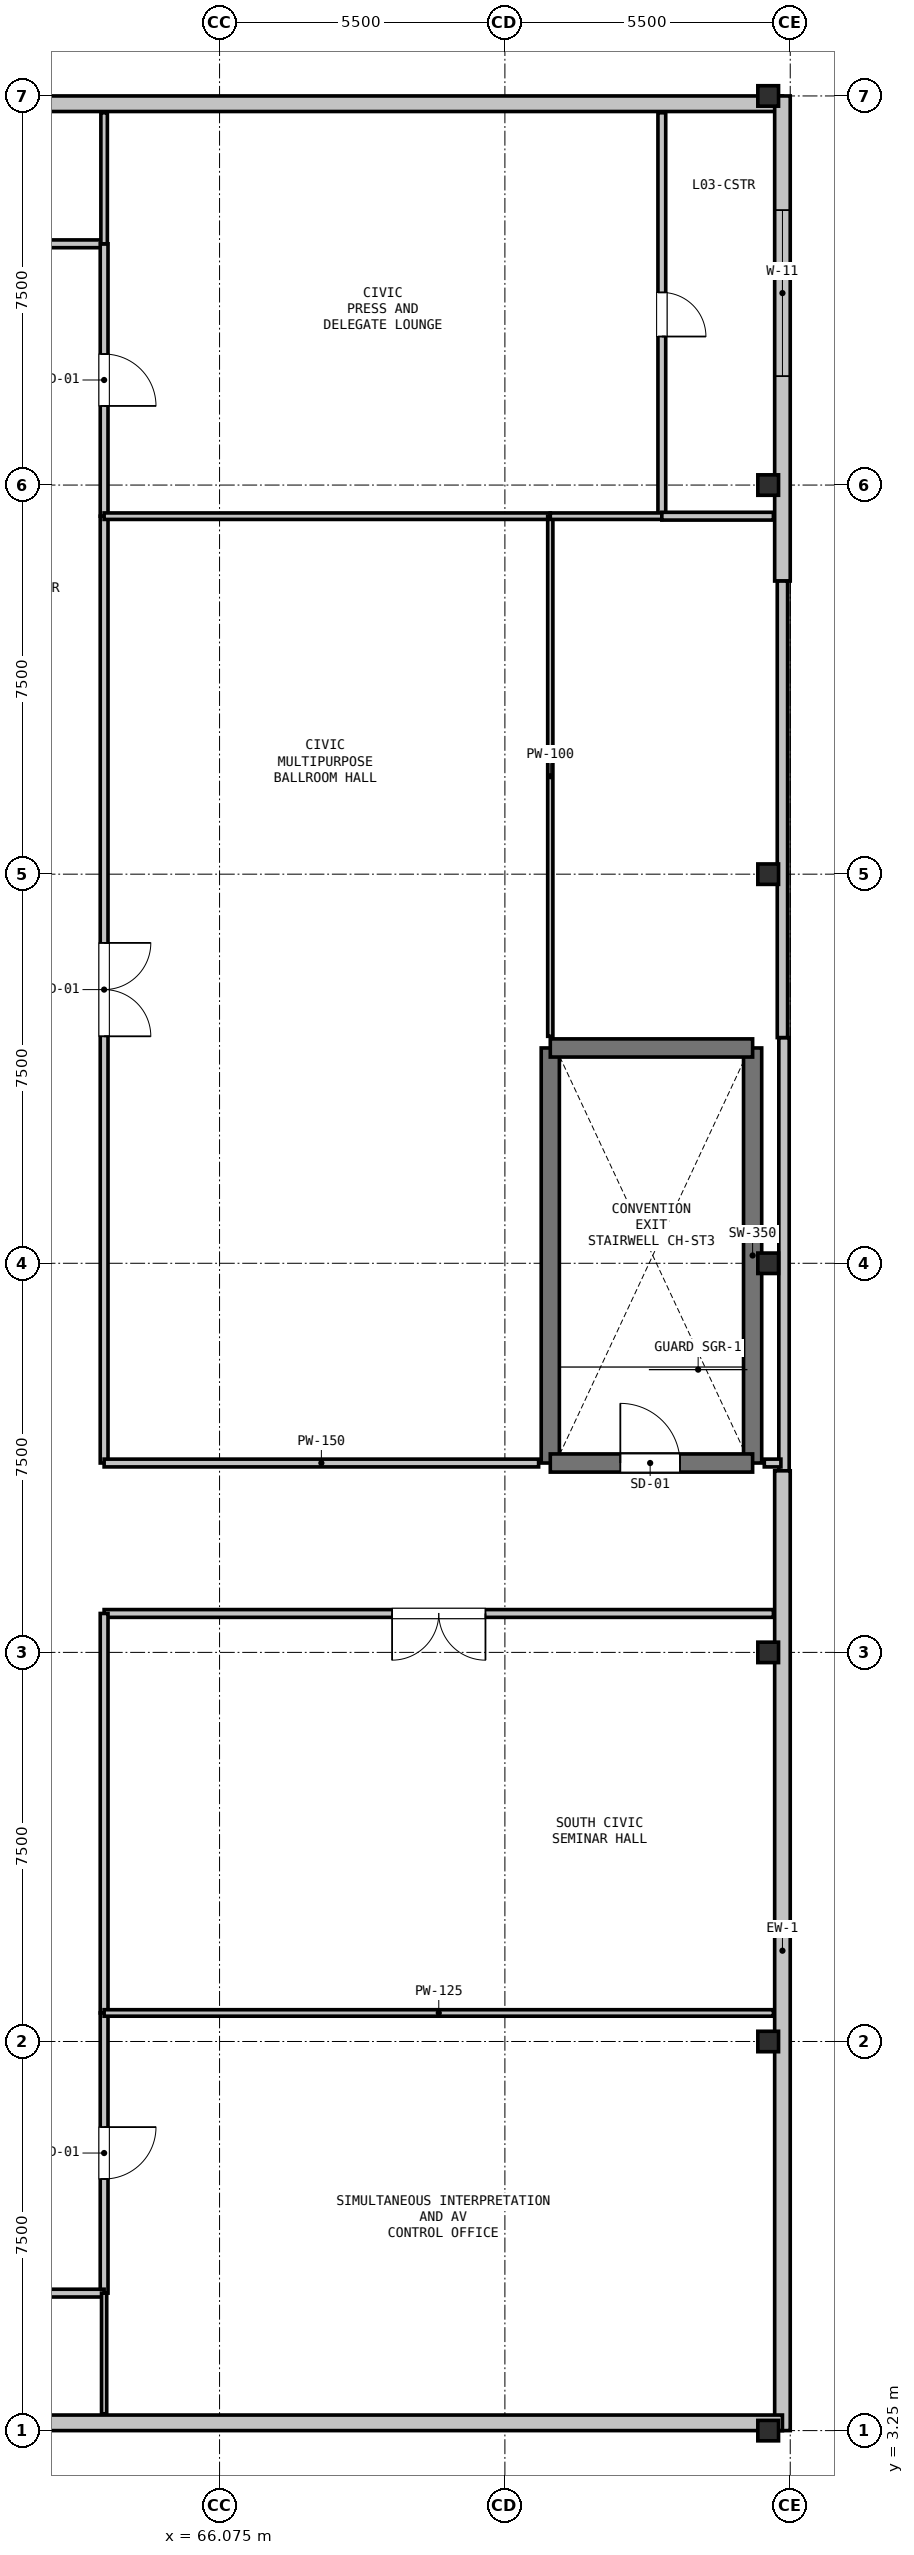
"""IFC4 building model, lengths in metres.
Left out: names, types, materials, properties, quantities, classifications, styles, units other than length and angle.
Written with IfcOpenShell. Run it as: python <this file> out.ifc"""

import sys

from ifc_helpers import new_model, si_unit, direction, frame, frame_2d, origin, origin_2d, place, context, subcontext, project, spatial, rectangle, i_section, extrude, element, fill, save


model = new_model("IFC4")
c1 = context("Model", 3, precision=1e-05, world=origin(), true_north=direction((0.0, 1.0)))
c2 = subcontext(c1, "Body", "Model", "MODEL_VIEW")
j1 = project(units=[si_unit("LENGTHUNIT", "METRE"), si_unit("PLANEANGLEUNIT", "RADIAN")], contexts=[c1])
p1 = place(None, origin())
s1 = spatial("IfcSite", under=j1, at=p1, CompositionType="ELEMENT")
p2 = place(p1, origin())
s2 = spatial("IfcBuilding", under=s1, at=p2, CompositionType="ELEMENT")
p3 = place(p2, frame((0.0, 0.0, 14.4)))
s3 = spatial("IfcBuildingStorey", under=s2, at=p3, CompositionType="ELEMENT", Elevation=14.4)
for number, where, z_axis, x_axis in (
    (1, (76.65, 3.25, 0.0), (0.0, 0.0, 1.0), (1.0, 0.0, 0.0)),
    (2, (76.65, 10.75, 0.0), (0.0, 0.0, 1.0), (1.0, 0.0, 0.0)),
    (3, (76.65, 18.25, 0.0), (0.0, 0.0, 1.0), (1.0, 0.0, 0.0)),
    (4, (76.65, 25.75, 0.0), (0.0, 0.0, 1.0), (1.0, 0.0, 0.0)),
    (5, (76.65, 33.25, 0.0), (0.0, 0.0, 1.0), (1.0, 0.0, 0.0)),
    (6, (76.65, 40.75, 0.0), (0.0, 0.0, 1.0), (1.0, 0.0, 0.0)),
    (7, (76.65, 48.25, 0.0), (0.0, 0.0, 1.0), (1.0, 0.0, 0.0)),
):
    element("IfcColumn", number, at=place(p3, frame(where, z_axis=z_axis, x_axis=x_axis)), inside=s3, PredefinedType="COLUMN", context=c2, shape_type="SweptSolid", body=[
        extrude(i_section(OverallWidth=0.399, OverallDepth=0.394, WebThickness=0.023, FlangeThickness=0.037, at=origin_2d()), origin(), (0.0, 0.0, 1.0), 4.8),
    ])
p4 = place(p3, frame((76.955, 30.1, 0.0), z_axis=(0.0, 0.0, 1.0), x_axis=(0.0, -1.0, 0.0)))
e8 = element("IfcWall", 8, at=p4, inside=s3, PredefinedType="PARAPET", context=c2, shape_type="SweptSolid", body=[
    extrude(rectangle(XDim=8.35, YDim=0.2, at=frame_2d((4.175, 0.0))), origin(), (0.0, 0.0, 1.0), 4.41),
])
p5 = place(p3, frame((59.8, 48.1, 0.0), z_axis=(0.0, 0.0, 1.0), x_axis=(1.0, 0.0, 0.0)))
e9 = element("IfcWall", 9, at=p5, inside=s3, PredefinedType="SOLIDWALL", context=c2, shape_type="SweptSolid", body=[
    extrude(rectangle(XDim=17.125, YDim=0.3, at=frame_2d((8.562, 0.0))), origin(), (0.0, 0.0, 1.0), 3.858),
])
p6 = place(p3, frame((76.925, 48.25, 0.0), z_axis=(0.0, 0.0, 1.0), x_axis=(0.0, -1.0, 0.0)))
e10 = element("IfcWall", 10, at=p6, inside=s3, PredefinedType="SOLIDWALL", context=c2, shape_type="SweptSolid", body=[
    extrude(rectangle(XDim=9.35, YDim=0.3, at=frame_2d((4.675, 0.0))), origin(), (0.0, 0.0, 1.0), 4.41),
])
p7 = place(p6, frame((2.2, 0.0, 0.9)))
e11 = element("IfcOpeningElement", 11, at=p7, cuts=e10, PredefinedType="OPENING", context=c2, shape_type="SweptSolid", body=[
    extrude(rectangle(XDim=3.2, YDim=2.4, at=frame_2d((1.6, 1.2))), frame((0.0, 0.16, 0.0), z_axis=(0.0, -1.0, 0.0), x_axis=(1.0, 0.0, 0.0)), (0.0, 0.0, 1.0), 0.32),
])
p8 = place(p3, frame((76.925, 21.75, 0.0), z_axis=(0.0, 0.0, 1.0), x_axis=(0.0, -1.0, 0.0)))
e12 = element("IfcWall", 12, at=p8, inside=s3, PredefinedType="SOLIDWALL", context=c2, shape_type="SweptSolid", body=[
    extrude(rectangle(XDim=18.5, YDim=0.3, at=frame_2d((9.25, 0.0))), origin(), (0.0, 0.0, 1.0), 4.41),
])
p9 = place(p3, frame((76.925, 3.4, 0.0), z_axis=(0.0, 0.0, 1.0), x_axis=(-1.0, 0.0, 0.0)))
e13 = element("IfcWall", 13, at=p9, inside=s3, PredefinedType="SOLIDWALL", context=c2, shape_type="SweptSolid", body=[
    extrude(rectangle(XDim=17.125, YDim=0.3, at=frame_2d((8.562, 0.0))), origin(), (0.0, 0.0, 1.0), 3.858),
])
p10 = place(p3, frame((76.925, 38.9, 0.0), z_axis=(0.0, 0.0, 1.0), x_axis=(0.0, -1.0, 0.0)))
e14 = element("IfcWall", 14, at=p10, inside=s3, PredefinedType="PARAPET", context=c2, shape_type="SweptSolid", body=[
    extrude(rectangle(XDim=8.8, YDim=0.2, at=frame_2d((4.4, 0.0))), origin(), (0.0, 0.0, 1.0), 0.2),
])
for number, where, z_axis, x_axis in (
    (15, (76.35, 29.9, 0.0), (0.0, 0.0, 1.0), (0.0, -1.0, 0.0)),
    (16, (72.45, 21.9, 0.0), (0.0, 0.0, 1.0), (0.0, 1.0, 0.0)),
):
    element("IfcWall", number, at=place(p3, frame(where, z_axis=z_axis, x_axis=x_axis)), inside=s3, PredefinedType="SHEAR", context=c2, shape_type="SweptSolid", body=[
        extrude(rectangle(XDim=8.0, YDim=0.35, at=frame_2d((4.0, 0.0))), origin(), (0.0, 0.0, 1.0), 4.8),
    ])
p11 = place(p3, frame((72.45, 29.9, 0.0), z_axis=(0.0, 0.0, 1.0), x_axis=(1.0, 0.0, 0.0)))
e17 = element("IfcWall", 17, at=p11, inside=s3, PredefinedType="SHEAR", context=c2, shape_type="SweptSolid", body=[
    extrude(rectangle(XDim=3.9, YDim=0.35, at=frame_2d((1.95, 0.0))), origin(), (0.0, 0.0, 1.0), 4.8),
])
p12 = place(p3, frame((72.45, 21.9, 0.0), z_axis=(0.0, 0.0, 1.0), x_axis=(1.0, 0.0, 0.0)))
e18 = element("IfcWall", 18, at=p12, inside=s3, PredefinedType="SHEAR", context=c2, shape_type="SweptSolid", body=[
    extrude(rectangle(XDim=3.9, YDim=0.35, at=frame_2d((1.95, 0.0))), origin(), (0.0, 0.0, 1.0), 4.8),
])
p13 = place(p12, frame((1.35, 0.0, 0.0)))
e19 = element("IfcOpeningElement", 19, at=p13, cuts=e18, PredefinedType="OPENING", context=c2, shape_type="SweptSolid", body=[
    extrude(rectangle(XDim=1.15, YDim=2.15, at=frame_2d((0.575, 1.075))), frame((0.0, 0.185, 0.0), z_axis=(0.0, -1.0, 0.0), x_axis=(1.0, 0.0, 0.0)), (0.0, 0.0, 1.0), 0.37),
])
p14 = place(p3, frame((61.875, 45.4, 0.0), z_axis=(0.0, 0.0, 1.0), x_axis=(1.0, 0.0, 0.0)))
e20 = element("IfcWall", 20, at=p14, inside=s3, PredefinedType="PARTITIONING", context=c2, shape_type="SweptSolid", body=[
    extrude(rectangle(XDim=1.975, YDim=0.15, at=frame_2d((0.988, 0.0))), origin(), (0.0, 0.0, 1.0), 4.479),
])
p15 = place(p3, frame((63.85, 45.4, 0.0), z_axis=(0.0, 0.0, 1.0), x_axis=(0.0, -1.0, 0.0)))
e21 = element("IfcWall", 21, at=p15, inside=s3, PredefinedType="PARTITIONING", context=c2, shape_type="SweptSolid", body=[
    extrude(rectangle(XDim=5.25, YDim=0.15, at=frame_2d((2.625, 0.0))), origin(), (0.0, 0.0, 1.0), 3.858),
])
p16 = place(p15, frame((2.125, 0.0, 0.0)))
e22 = element("IfcOpeningElement", 22, at=p16, cuts=e21, PredefinedType="OPENING", context=c2, shape_type="SweptSolid", body=[
    extrude(rectangle(XDim=1.0, YDim=2.15, at=frame_2d((0.5, 1.075))), frame((0.0, 0.085, 0.0), z_axis=(0.0, -1.0, 0.0), x_axis=(1.0, 0.0, 0.0)), (0.0, 0.0, 1.0), 0.17),
])
p17 = place(p3, frame((63.85, 40.15, 0.0), z_axis=(0.0, 0.0, 1.0), x_axis=(0.0, -1.0, 0.0)))
e23 = element("IfcWall", 23, at=p17, inside=s3, PredefinedType="PARTITIONING", context=c2, shape_type="SweptSolid", body=[
    extrude(rectangle(XDim=18.25, YDim=0.15, at=frame_2d((9.125, 0.0))), origin(), (0.0, 0.0, 1.0), 3.858),
])
p18 = place(p17, frame((8.225, 0.0, 0.0)))
e24 = element("IfcOpeningElement", 24, at=p18, cuts=e23, PredefinedType="OPENING", context=c2, shape_type="SweptSolid", body=[
    extrude(rectangle(XDim=1.8, YDim=2.2, at=frame_2d((0.9, 1.1))), frame((0.0, 0.085, 0.0), z_axis=(0.0, -1.0, 0.0), x_axis=(1.0, 0.0, 0.0)), (0.0, 0.0, 1.0), 0.17),
])
p19 = place(p3, frame((63.85, 21.9, 0.0), z_axis=(0.0, 0.0, 1.0), x_axis=(1.0, 0.0, 0.0)))
e25 = element("IfcWall", 25, at=p19, inside=s3, PredefinedType="PARTITIONING", context=c2, shape_type="SweptSolid", body=[
    extrude(rectangle(XDim=8.375, YDim=0.15, at=frame_2d((4.188, 0.0))), origin(), (0.0, 0.0, 1.0), 4.479),
])
p20 = place(p3, frame((76.575, 21.9, 0.0), z_axis=(0.0, 0.0, 1.0), x_axis=(1.0, 0.0, 0.0)))
e26 = element("IfcWall", 26, at=p20, inside=s3, PredefinedType="PARTITIONING", context=c2, shape_type="SweptSolid", body=[
    extrude(rectangle(XDim=0.32, YDim=0.15, at=frame_2d((0.16, 0.0))), origin(), (0.0, 0.0, 1.0), 4.41),
])
p21 = place(p3, frame((76.751, 19.0, 0.0), z_axis=(0.0, 0.0, 1.0), x_axis=(-1.0, 0.0, 0.0)))
e27 = element("IfcWall", 27, at=p21, inside=s3, PredefinedType="PARTITIONING", context=c2, shape_type="SweptSolid", body=[
    extrude(rectangle(XDim=12.901, YDim=0.15, at=frame_2d((6.45, 0.0))), origin(), (0.0, 0.0, 1.0), 4.41),
])
p22 = place(p21, frame((5.551, 0.0, 0.0)))
e28 = element("IfcOpeningElement", 28, at=p22, cuts=e27, PredefinedType="OPENING", context=c2, shape_type="SweptSolid", body=[
    extrude(rectangle(XDim=1.8, YDim=2.2, at=frame_2d((0.9, 1.1))), frame((0.0, 0.085, 0.0), z_axis=(0.0, -1.0, 0.0), x_axis=(1.0, 0.0, 0.0)), (0.0, 0.0, 1.0), 0.17),
])
p23 = place(p3, frame((63.85, 19.0, 0.0), z_axis=(0.0, 0.0, 1.0), x_axis=(0.0, -1.0, 0.0)))
e29 = element("IfcWall", 29, at=p23, inside=s3, PredefinedType="PARTITIONING", context=c2, shape_type="SweptSolid", body=[
    extrude(rectangle(XDim=7.7, YDim=0.15, at=frame_2d((3.85, 0.0))), origin(), (0.0, 0.0, 1.0), 3.858),
])
p24 = place(p3, frame((63.85, 11.3, 0.0), z_axis=(0.0, 0.0, 1.0), x_axis=(0.0, -1.0, 0.0)))
e30 = element("IfcWall", 30, at=p24, inside=s3, PredefinedType="PARTITIONING", context=c2, shape_type="SweptSolid", body=[
    extrude(rectangle(XDim=5.4, YDim=0.15, at=frame_2d((2.7, 0.0))), origin(), (0.0, 0.0, 1.0), 3.858),
])
p25 = place(p24, frame((2.2, 0.0, 0.0)))
e31 = element("IfcOpeningElement", 31, at=p25, cuts=e30, PredefinedType="OPENING", context=c2, shape_type="SweptSolid", body=[
    extrude(rectangle(XDim=1.0, YDim=2.15, at=frame_2d((0.5, 1.075))), frame((0.0, 0.085, 0.0), z_axis=(0.0, -1.0, 0.0), x_axis=(1.0, 0.0, 0.0)), (0.0, 0.0, 1.0), 0.17),
])
p26 = place(p3, frame((63.85, 5.9, 0.0), z_axis=(0.0, 0.0, 1.0), x_axis=(-1.0, 0.0, 0.0)))
e32 = element("IfcWall", 32, at=p26, inside=s3, PredefinedType="PARTITIONING", context=c2, shape_type="SweptSolid", body=[
    extrude(rectangle(XDim=1.975, YDim=0.15, at=frame_2d((0.988, 0.0))), origin(), (0.0, 0.0, 1.0), 4.479),
])
p27 = place(p3, frame((63.85, 40.15, 0.0), z_axis=(0.0, 0.0, 1.0), x_axis=(1.0, 0.0, 0.0)))
e33 = element("IfcWall", 33, at=p27, inside=s3, PredefinedType="PARTITIONING", context=c2, shape_type="SweptSolid", body=[
    extrude(rectangle(XDim=8.6, YDim=0.125, at=frame_2d((4.3, 0.0))), origin(), (0.0, 0.0, 1.0), 4.479),
])
p28 = place(p3, frame((72.45, 40.15, 0.0), z_axis=(0.0, 0.0, 1.0), x_axis=(0.0, -1.0, 0.0)))
e34 = element("IfcWall", 34, at=p28, inside=s3, PredefinedType="PARTITIONING", context=c2, shape_type="SweptSolid", body=[
    extrude(rectangle(XDim=10.025, YDim=0.1, at=frame_2d((5.012, 0.0))), origin(), (0.0, 0.0, 1.0), 3.858),
])
p29 = place(p3, frame((76.751, 11.3, 0.0), z_axis=(0.0, 0.0, 1.0), x_axis=(-1.0, 0.0, 0.0)))
e35 = element("IfcWall", 35, at=p29, inside=s3, PredefinedType="PARTITIONING", context=c2, shape_type="SweptSolid", body=[
    extrude(rectangle(XDim=12.901, YDim=0.125, at=frame_2d((6.45, 0.0))), origin(), (0.0, 0.0, 1.0), 4.41),
])
p30 = place(p3, frame((63.85, 3.574, 0.0), z_axis=(0.0, 0.0, 1.0), x_axis=(0.0, 1.0, 0.0)))
e36 = element("IfcWall", 36, at=p30, inside=s3, PredefinedType="PARTITIONING", context=c2, shape_type="SweptSolid", body=[
    extrude(rectangle(XDim=2.326, YDim=0.1, at=frame_2d((1.163, 0.0))), origin(), (0.0, 0.0, 1.0), 4.8),
])
p31 = place(p3, frame((63.85, 45.4, 0.0), z_axis=(0.0, 0.0, 1.0), x_axis=(0.0, 1.0, 0.0)))
e37 = element("IfcWall", 37, at=p31, inside=s3, PredefinedType="PARTITIONING", context=c2, shape_type="SweptSolid", body=[
    extrude(rectangle(XDim=2.526, YDim=0.125, at=frame_2d((1.263, 0.0))), origin(), (0.0, 0.0, 1.0), 4.8),
])
p32 = place(p3, frame((74.6, 47.926, 0.0), z_axis=(0.0, 0.0, 1.0), x_axis=(0.0, -1.0, 0.0)))
e38 = element("IfcWall", 38, at=p32, inside=s3, PredefinedType="PARTITIONING", context=c2, shape_type="SweptSolid", body=[
    extrude(rectangle(XDim=7.776, YDim=0.15, at=frame_2d((3.888, 0.0))), origin(), (0.0, 0.0, 1.0), 3.858),
])
p33 = place(p32, frame((3.463, 0.0, 0.0)))
e39 = element("IfcOpeningElement", 39, at=p33, cuts=e38, PredefinedType="OPENING", context=c2, shape_type="SweptSolid", body=[
    extrude(rectangle(XDim=0.85, YDim=2.1, at=frame_2d((0.425, 1.05))), frame((0.0, 0.085, 0.0), z_axis=(0.0, -1.0, 0.0), x_axis=(1.0, 0.0, 0.0)), (0.0, 0.0, 1.0), 0.17),
])
p34 = place(p3, frame((74.6, 40.15, 0.0), z_axis=(0.0, 0.0, 1.0), x_axis=(-1.0, 0.0, 0.0)))
e40 = element("IfcWall", 40, at=p34, inside=s3, PredefinedType="PARTITIONING", context=c2, shape_type="SweptSolid", body=[
    extrude(rectangle(XDim=2.15, YDim=0.125, at=frame_2d((1.075, 0.0))), origin(), (0.0, 0.0, 1.0), 4.8),
])
p35 = place(p3, frame((76.751, 40.15, 0.0), z_axis=(0.0, 0.0, 1.0), x_axis=(-1.0, 0.0, 0.0)))
e41 = element("IfcWall", 41, at=p35, inside=s3, PredefinedType="PARTITIONING", context=c2, shape_type="SweptSolid", body=[
    extrude(rectangle(XDim=2.151, YDim=0.15, at=frame_2d((1.075, 0.0))), origin(), (0.0, 0.0, 1.0), 4.41),
])
p36 = place(p7, origin())
e42 = element("IfcWindow", 42, at=p36, inside=s3, PartitioningType="SINGLE_PANEL", PredefinedType="WINDOW", context=c2, shape_type="SweptSolid", body=[
    extrude(rectangle(XDim=3.2, YDim=2.4, at=frame_2d((1.6, 1.2))), frame((0.0, 0.03, 0.0), z_axis=(0.0, -1.0, 0.0), x_axis=(1.0, 0.0, 0.0)), (0.0, 0.0, 1.0), 0.06),
])
fill(e11, e42)
p37 = place(p13, origin())
e43 = element("IfcDoor", 43, at=p37, inside=s3, OperationType="SINGLE_SWING_LEFT", PredefinedType="DOOR", context=c2, shape_type="SweptSolid", body=[
    extrude(rectangle(XDim=1.15, YDim=2.15, at=frame_2d((0.575, 1.075))), frame((0.0, 0.025, 0.0), z_axis=(0.0, -1.0, 0.0), x_axis=(1.0, 0.0, 0.0)), (0.0, 0.0, 1.0), 0.05),
])
fill(e19, e43)
p38 = place(p18, origin())
e44 = element("IfcDoor", 44, at=p38, inside=s3, OperationType="DOUBLE_DOOR_SINGLE_SWING", PredefinedType="DOOR", context=c2, shape_type="SweptSolid", body=[
    extrude(rectangle(XDim=1.8, YDim=2.2, at=frame_2d((0.9, 1.1))), frame((0.0, 0.025, 0.0), z_axis=(0.0, -1.0, 0.0), x_axis=(1.0, 0.0, 0.0)), (0.0, 0.0, 1.0), 0.05),
])
fill(e24, e44)
p39 = place(p22, origin())
e45 = element("IfcDoor", 45, at=p39, inside=s3, OperationType="DOUBLE_DOOR_SINGLE_SWING", PredefinedType="DOOR", context=c2, shape_type="SweptSolid", body=[
    extrude(rectangle(XDim=1.8, YDim=2.2, at=frame_2d((0.9, 1.1))), frame((0.0, 0.025, 0.0), z_axis=(0.0, -1.0, 0.0), x_axis=(1.0, 0.0, 0.0)), (0.0, 0.0, 1.0), 0.05),
])
fill(e28, e45)
p40 = place(p25, origin())
e46 = element("IfcDoor", 46, at=p40, inside=s3, OperationType="SINGLE_SWING_LEFT", PredefinedType="DOOR", context=c2, shape_type="SweptSolid", body=[
    extrude(rectangle(XDim=1.0, YDim=2.15, at=frame_2d((0.5, 1.075))), frame((0.0, 0.025, 0.0), z_axis=(0.0, -1.0, 0.0), x_axis=(1.0, 0.0, 0.0)), (0.0, 0.0, 1.0), 0.05),
])
fill(e31, e46)
p41 = place(p16, origin())
e47 = element("IfcDoor", 47, at=p41, inside=s3, OperationType="SINGLE_SWING_RIGHT", PredefinedType="DOOR", context=c2, shape_type="SweptSolid", body=[
    extrude(rectangle(XDim=1.0, YDim=2.15, at=frame_2d((0.5, 1.075))), frame((0.0, 0.025, 0.0), z_axis=(0.0, -1.0, 0.0), x_axis=(1.0, 0.0, 0.0)), (0.0, 0.0, 1.0), 0.05),
])
fill(e22, e47)
p42 = place(p33, origin())
e48 = element("IfcDoor", 48, at=p42, inside=s3, OperationType="SINGLE_SWING_RIGHT", PredefinedType="DOOR", context=c2, shape_type="SweptSolid", body=[
    extrude(rectangle(XDim=0.85, YDim=2.1, at=frame_2d((0.425, 1.05))), frame((0.0, 0.025, 0.0), z_axis=(0.0, -1.0, 0.0), x_axis=(1.0, 0.0, 0.0)), (0.0, 0.0, 1.0), 0.05),
])
fill(e39, e48)
save(model, sys.argv[1])
